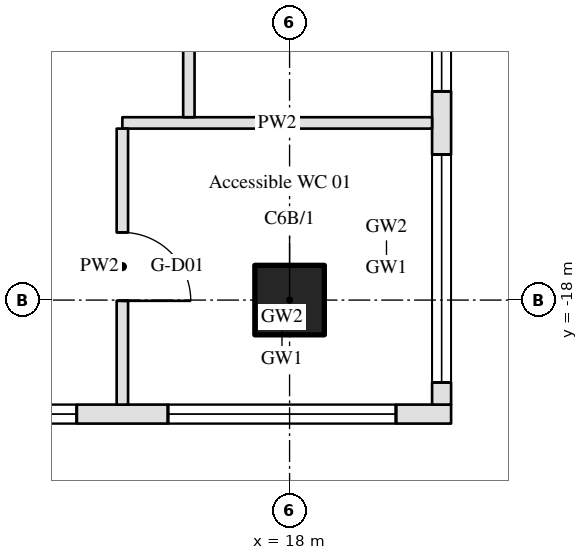
"""IFC4 building model, lengths in metres.
Left out: names, types, materials, properties, quantities, classifications, styles, units other than length and angle.
Written with IfcOpenShell. Run it as: python <this file> out.ifc"""

import sys

from ifc_helpers import new_model, si_unit, direction, frame, frame_2d, origin, origin_2d, place, context, subcontext, project, spatial, rectangle, hollow_circle, extrude, element, fill, save


model = new_model("IFC4")
c1 = context("Model", 3, precision=1e-05, world=origin(), true_north=direction((0.0, 1.0)))
c2 = subcontext(c1, "Body", "Model", "MODEL_VIEW")
j1 = project(units=[si_unit("LENGTHUNIT", "METRE"), si_unit("PLANEANGLEUNIT", "RADIAN")], contexts=[c1])
p1 = place(None, origin())
s1 = spatial("IfcSite", under=j1, at=p1, CompositionType="ELEMENT")
p2 = place(p1, origin())
s2 = spatial("IfcBuilding", under=s1, at=p2, CompositionType="ELEMENT")
p3 = place(p2, origin())
s3 = spatial("IfcBuildingStorey", under=s2, at=p3, CompositionType="ELEMENT", Elevation=0.0)
p4 = place(p3, frame((18.0, -18.0, 0.0), z_axis=(0.0, 0.0, 1.0), x_axis=(1.0, 0.0, 0.0)))
e1 = element("IfcColumn", 1, at=p4, inside=s3, PredefinedType="COLUMN", context=c2, shape_type="SweptSolid", body=[
    extrude(hollow_circle(Radius=0.457, WallThickness=0.05, at=origin_2d()), origin(), (0.0, 0.0, 1.0), 10.8),
])
p5 = place(p3, frame((-22.125, -19.5, 0.0), z_axis=(0.0, 0.0, 1.0), x_axis=(1.0, 0.0, 0.0)))
e2 = element("IfcWall", 2, at=p5, inside=s3, PredefinedType="STANDARD", context=c2, shape_type="SweptSolid", body=[
    extrude(rectangle(XDim=42.25, YDim=0.25, at=frame_2d((21.125, 0.0))), origin(), (0.0, 0.0, 1.0), 10.0),
])
p6 = place(p5, frame((0.725, 0.0, 0.15)))
e3 = element("IfcOpeningElement", 3, at=p6, cuts=e2, PredefinedType="OPENING", context=c2, shape_type="SweptSolid", body=[
    extrude(rectangle(XDim=3.0, YDim=4.2, at=frame_2d((1.5, 2.1))), frame((0.0, 0.135, 0.0), z_axis=(0.0, -1.0, 0.0), x_axis=(1.0, 0.0, 0.0)), (0.0, 0.0, 1.0), 0.27),
])
p7 = place(p5, frame((0.725, 0.0, 4.95)))
e4 = element("IfcOpeningElement", 4, at=p7, cuts=e2, PredefinedType="OPENING", context=c2, shape_type="SweptSolid", body=[
    extrude(rectangle(XDim=3.0, YDim=4.4, at=frame_2d((1.5, 2.2))), frame((0.0, 0.135, 0.0), z_axis=(0.0, -1.0, 0.0), x_axis=(1.0, 0.0, 0.0)), (0.0, 0.0, 1.0), 0.27),
])
p8 = place(p5, frame((4.925, 0.0, 0.15)))
e5 = element("IfcOpeningElement", 5, at=p8, cuts=e2, PredefinedType="OPENING", context=c2, shape_type="SweptSolid", body=[
    extrude(rectangle(XDim=3.0, YDim=4.2, at=frame_2d((1.5, 2.1))), frame((0.0, 0.135, 0.0), z_axis=(0.0, -1.0, 0.0), x_axis=(1.0, 0.0, 0.0)), (0.0, 0.0, 1.0), 0.27),
])
p9 = place(p5, frame((4.925, 0.0, 4.95)))
e6 = element("IfcOpeningElement", 6, at=p9, cuts=e2, PredefinedType="OPENING", context=c2, shape_type="SweptSolid", body=[
    extrude(rectangle(XDim=3.0, YDim=4.4, at=frame_2d((1.5, 2.2))), frame((0.0, 0.135, 0.0), z_axis=(0.0, -1.0, 0.0), x_axis=(1.0, 0.0, 0.0)), (0.0, 0.0, 1.0), 0.27),
])
p10 = place(p5, frame((9.125, 0.0, 0.15)))
e7 = element("IfcOpeningElement", 7, at=p10, cuts=e2, PredefinedType="OPENING", context=c2, shape_type="SweptSolid", body=[
    extrude(rectangle(XDim=3.0, YDim=4.2, at=frame_2d((1.5, 2.1))), frame((0.0, 0.135, 0.0), z_axis=(0.0, -1.0, 0.0), x_axis=(1.0, 0.0, 0.0)), (0.0, 0.0, 1.0), 0.27),
])
p11 = place(p5, frame((9.125, 0.0, 4.95)))
e8 = element("IfcOpeningElement", 8, at=p11, cuts=e2, PredefinedType="OPENING", context=c2, shape_type="SweptSolid", body=[
    extrude(rectangle(XDim=3.0, YDim=4.4, at=frame_2d((1.5, 2.2))), frame((0.0, 0.135, 0.0), z_axis=(0.0, -1.0, 0.0), x_axis=(1.0, 0.0, 0.0)), (0.0, 0.0, 1.0), 0.27),
])
p12 = place(p5, frame((13.325, 0.0, 0.15)))
e9 = element("IfcOpeningElement", 9, at=p12, cuts=e2, PredefinedType="OPENING", context=c2, shape_type="SweptSolid", body=[
    extrude(rectangle(XDim=3.0, YDim=4.2, at=frame_2d((1.5, 2.1))), frame((0.0, 0.135, 0.0), z_axis=(0.0, -1.0, 0.0), x_axis=(1.0, 0.0, 0.0)), (0.0, 0.0, 1.0), 0.27),
])
p13 = place(p5, frame((13.325, 0.0, 4.95)))
e10 = element("IfcOpeningElement", 10, at=p13, cuts=e2, PredefinedType="OPENING", context=c2, shape_type="SweptSolid", body=[
    extrude(rectangle(XDim=3.0, YDim=4.4, at=frame_2d((1.5, 2.2))), frame((0.0, 0.135, 0.0), z_axis=(0.0, -1.0, 0.0), x_axis=(1.0, 0.0, 0.0)), (0.0, 0.0, 1.0), 0.27),
])
p14 = place(p5, frame((17.825, 0.0, 0.0)))
e11 = element("IfcOpeningElement", 11, at=p14, cuts=e2, PredefinedType="OPENING", context=c2, shape_type="SweptSolid", body=[
    extrude(rectangle(XDim=2.4, YDim=2.6, at=frame_2d((1.2, 1.3))), frame((0.0, 0.135, 0.0), z_axis=(0.0, -1.0, 0.0), x_axis=(1.0, 0.0, 0.0)), (0.0, 0.0, 1.0), 0.27),
])
p15 = place(p5, frame((17.525, 0.0, 2.9)))
e12 = element("IfcOpeningElement", 12, at=p15, cuts=e2, PredefinedType="OPENING", context=c2, shape_type="SweptSolid", body=[
    extrude(rectangle(XDim=3.0, YDim=1.45, at=frame_2d((1.5, 0.725))), frame((0.0, 0.135, 0.0), z_axis=(0.0, -1.0, 0.0), x_axis=(1.0, 0.0, 0.0)), (0.0, 0.0, 1.0), 0.27),
])
p16 = place(p5, frame((17.525, 0.0, 4.95)))
e13 = element("IfcOpeningElement", 13, at=p16, cuts=e2, PredefinedType="OPENING", context=c2, shape_type="SweptSolid", body=[
    extrude(rectangle(XDim=3.0, YDim=4.4, at=frame_2d((1.5, 2.2))), frame((0.0, 0.135, 0.0), z_axis=(0.0, -1.0, 0.0), x_axis=(1.0, 0.0, 0.0)), (0.0, 0.0, 1.0), 0.27),
])
p17 = place(p5, frame((21.725, 0.0, 0.15)))
e14 = element("IfcOpeningElement", 14, at=p17, cuts=e2, PredefinedType="OPENING", context=c2, shape_type="SweptSolid", body=[
    extrude(rectangle(XDim=3.0, YDim=4.2, at=frame_2d((1.5, 2.1))), frame((0.0, 0.135, 0.0), z_axis=(0.0, -1.0, 0.0), x_axis=(1.0, 0.0, 0.0)), (0.0, 0.0, 1.0), 0.27),
])
p18 = place(p5, frame((21.725, 0.0, 4.95)))
e15 = element("IfcOpeningElement", 15, at=p18, cuts=e2, PredefinedType="OPENING", context=c2, shape_type="SweptSolid", body=[
    extrude(rectangle(XDim=3.0, YDim=4.4, at=frame_2d((1.5, 2.2))), frame((0.0, 0.135, 0.0), z_axis=(0.0, -1.0, 0.0), x_axis=(1.0, 0.0, 0.0)), (0.0, 0.0, 1.0), 0.27),
])
p19 = place(p5, frame((26.225, 0.0, 0.0)))
e16 = element("IfcOpeningElement", 16, at=p19, cuts=e2, PredefinedType="OPENING", context=c2, shape_type="SweptSolid", body=[
    extrude(rectangle(XDim=2.4, YDim=2.6, at=frame_2d((1.2, 1.3))), frame((0.0, 0.135, 0.0), z_axis=(0.0, -1.0, 0.0), x_axis=(1.0, 0.0, 0.0)), (0.0, 0.0, 1.0), 0.27),
])
p20 = place(p5, frame((25.925, 0.0, 2.9)))
e17 = element("IfcOpeningElement", 17, at=p20, cuts=e2, PredefinedType="OPENING", context=c2, shape_type="SweptSolid", body=[
    extrude(rectangle(XDim=3.0, YDim=1.45, at=frame_2d((1.5, 0.725))), frame((0.0, 0.135, 0.0), z_axis=(0.0, -1.0, 0.0), x_axis=(1.0, 0.0, 0.0)), (0.0, 0.0, 1.0), 0.27),
])
p21 = place(p5, frame((25.925, 0.0, 4.95)))
e18 = element("IfcOpeningElement", 18, at=p21, cuts=e2, PredefinedType="OPENING", context=c2, shape_type="SweptSolid", body=[
    extrude(rectangle(XDim=3.0, YDim=4.4, at=frame_2d((1.5, 2.2))), frame((0.0, 0.135, 0.0), z_axis=(0.0, -1.0, 0.0), x_axis=(1.0, 0.0, 0.0)), (0.0, 0.0, 1.0), 0.27),
])
p22 = place(p5, frame((30.125, 0.0, 0.15)))
e19 = element("IfcOpeningElement", 19, at=p22, cuts=e2, PredefinedType="OPENING", context=c2, shape_type="SweptSolid", body=[
    extrude(rectangle(XDim=3.0, YDim=4.2, at=frame_2d((1.5, 2.1))), frame((0.0, 0.135, 0.0), z_axis=(0.0, -1.0, 0.0), x_axis=(1.0, 0.0, 0.0)), (0.0, 0.0, 1.0), 0.27),
])
p23 = place(p5, frame((30.125, 0.0, 4.95)))
e20 = element("IfcOpeningElement", 20, at=p23, cuts=e2, PredefinedType="OPENING", context=c2, shape_type="SweptSolid", body=[
    extrude(rectangle(XDim=3.0, YDim=4.4, at=frame_2d((1.5, 2.2))), frame((0.0, 0.135, 0.0), z_axis=(0.0, -1.0, 0.0), x_axis=(1.0, 0.0, 0.0)), (0.0, 0.0, 1.0), 0.27),
])
p24 = place(p5, frame((34.325, 0.0, 0.15)))
e21 = element("IfcOpeningElement", 21, at=p24, cuts=e2, PredefinedType="OPENING", context=c2, shape_type="SweptSolid", body=[
    extrude(rectangle(XDim=3.0, YDim=4.2, at=frame_2d((1.5, 2.1))), frame((0.0, 0.135, 0.0), z_axis=(0.0, -1.0, 0.0), x_axis=(1.0, 0.0, 0.0)), (0.0, 0.0, 1.0), 0.27),
])
p25 = place(p5, frame((34.325, 0.0, 4.95)))
e22 = element("IfcOpeningElement", 22, at=p25, cuts=e2, PredefinedType="OPENING", context=c2, shape_type="SweptSolid", body=[
    extrude(rectangle(XDim=3.0, YDim=4.4, at=frame_2d((1.5, 2.2))), frame((0.0, 0.135, 0.0), z_axis=(0.0, -1.0, 0.0), x_axis=(1.0, 0.0, 0.0)), (0.0, 0.0, 1.0), 0.27),
])
p26 = place(p5, frame((38.525, 0.0, 0.15)))
e23 = element("IfcOpeningElement", 23, at=p26, cuts=e2, PredefinedType="OPENING", context=c2, shape_type="SweptSolid", body=[
    extrude(rectangle(XDim=3.0, YDim=4.2, at=frame_2d((1.5, 2.1))), frame((0.0, 0.135, 0.0), z_axis=(0.0, -1.0, 0.0), x_axis=(1.0, 0.0, 0.0)), (0.0, 0.0, 1.0), 0.27),
])
p27 = place(p5, frame((38.525, 0.0, 4.95)))
e24 = element("IfcOpeningElement", 24, at=p27, cuts=e2, PredefinedType="OPENING", context=c2, shape_type="SweptSolid", body=[
    extrude(rectangle(XDim=3.0, YDim=4.4, at=frame_2d((1.5, 2.2))), frame((0.0, 0.135, 0.0), z_axis=(0.0, -1.0, 0.0), x_axis=(1.0, 0.0, 0.0)), (0.0, 0.0, 1.0), 0.27),
])
p28 = place(p3, frame((20.0, -19.375, 0.0), z_axis=(0.0, 0.0, 1.0), x_axis=(0.0, 1.0, 0.0)))
e25 = element("IfcWall", 25, at=p28, inside=s3, PredefinedType="STANDARD", context=c2, shape_type="SweptSolid", body=[
    extrude(rectangle(XDim=30.4, YDim=0.25, at=frame_2d((15.2, 0.0))), origin(), (0.0, 0.0, 1.0), 10.0),
])
p29 = place(p28, frame((0.291, 0.0, 0.15)))
e26 = element("IfcOpeningElement", 26, at=p29, cuts=e25, PredefinedType="OPENING", context=c2, shape_type="SweptSolid", body=[
    extrude(rectangle(XDim=3.0, YDim=4.2, at=frame_2d((1.5, 2.1))), frame((0.0, 0.135, 0.0), z_axis=(0.0, -1.0, 0.0), x_axis=(1.0, 0.0, 0.0)), (0.0, 0.0, 1.0), 0.27),
])
p30 = place(p28, frame((0.291, 0.0, 4.95)))
e27 = element("IfcOpeningElement", 27, at=p30, cuts=e25, PredefinedType="OPENING", context=c2, shape_type="SweptSolid", body=[
    extrude(rectangle(XDim=3.0, YDim=4.4, at=frame_2d((1.5, 2.2))), frame((0.0, 0.135, 0.0), z_axis=(0.0, -1.0, 0.0), x_axis=(1.0, 0.0, 0.0)), (0.0, 0.0, 1.0), 0.27),
])
p31 = place(p28, frame((4.122, 0.0, 0.15)))
e28 = element("IfcOpeningElement", 28, at=p31, cuts=e25, PredefinedType="OPENING", context=c2, shape_type="SweptSolid", body=[
    extrude(rectangle(XDim=3.0, YDim=4.2, at=frame_2d((1.5, 2.1))), frame((0.0, 0.135, 0.0), z_axis=(0.0, -1.0, 0.0), x_axis=(1.0, 0.0, 0.0)), (0.0, 0.0, 1.0), 0.27),
])
p32 = place(p28, frame((4.122, 0.0, 4.95)))
e29 = element("IfcOpeningElement", 29, at=p32, cuts=e25, PredefinedType="OPENING", context=c2, shape_type="SweptSolid", body=[
    extrude(rectangle(XDim=3.0, YDim=4.4, at=frame_2d((1.5, 2.2))), frame((0.0, 0.135, 0.0), z_axis=(0.0, -1.0, 0.0), x_axis=(1.0, 0.0, 0.0)), (0.0, 0.0, 1.0), 0.27),
])
p33 = place(p28, frame((7.953, 0.0, 0.15)))
e30 = element("IfcOpeningElement", 30, at=p33, cuts=e25, PredefinedType="OPENING", context=c2, shape_type="SweptSolid", body=[
    extrude(rectangle(XDim=3.0, YDim=4.2, at=frame_2d((1.5, 2.1))), frame((0.0, 0.135, 0.0), z_axis=(0.0, -1.0, 0.0), x_axis=(1.0, 0.0, 0.0)), (0.0, 0.0, 1.0), 0.27),
])
p34 = place(p28, frame((7.953, 0.0, 4.95)))
e31 = element("IfcOpeningElement", 31, at=p34, cuts=e25, PredefinedType="OPENING", context=c2, shape_type="SweptSolid", body=[
    extrude(rectangle(XDim=3.0, YDim=4.4, at=frame_2d((1.5, 2.2))), frame((0.0, 0.135, 0.0), z_axis=(0.0, -1.0, 0.0), x_axis=(1.0, 0.0, 0.0)), (0.0, 0.0, 1.0), 0.27),
])
p35 = place(p28, frame((12.084, 0.0, 0.0)))
e32 = element("IfcOpeningElement", 32, at=p35, cuts=e25, PredefinedType="OPENING", context=c2, shape_type="SweptSolid", body=[
    extrude(rectangle(XDim=2.4, YDim=2.6, at=frame_2d((1.2, 1.3))), frame((0.0, 0.135, 0.0), z_axis=(0.0, -1.0, 0.0), x_axis=(1.0, 0.0, 0.0)), (0.0, 0.0, 1.0), 0.27),
])
p36 = place(p28, frame((11.784, 0.0, 2.9)))
e33 = element("IfcOpeningElement", 33, at=p36, cuts=e25, PredefinedType="OPENING", context=c2, shape_type="SweptSolid", body=[
    extrude(rectangle(XDim=3.0, YDim=1.45, at=frame_2d((1.5, 0.725))), frame((0.0, 0.135, 0.0), z_axis=(0.0, -1.0, 0.0), x_axis=(1.0, 0.0, 0.0)), (0.0, 0.0, 1.0), 0.27),
])
p37 = place(p28, frame((11.784, 0.0, 4.95)))
e34 = element("IfcOpeningElement", 34, at=p37, cuts=e25, PredefinedType="OPENING", context=c2, shape_type="SweptSolid", body=[
    extrude(rectangle(XDim=3.0, YDim=4.4, at=frame_2d((1.5, 2.2))), frame((0.0, 0.135, 0.0), z_axis=(0.0, -1.0, 0.0), x_axis=(1.0, 0.0, 0.0)), (0.0, 0.0, 1.0), 0.27),
])
p38 = place(p28, frame((15.616, 0.0, 0.15)))
e35 = element("IfcOpeningElement", 35, at=p38, cuts=e25, PredefinedType="OPENING", context=c2, shape_type="SweptSolid", body=[
    extrude(rectangle(XDim=3.0, YDim=4.2, at=frame_2d((1.5, 2.1))), frame((0.0, 0.135, 0.0), z_axis=(0.0, -1.0, 0.0), x_axis=(1.0, 0.0, 0.0)), (0.0, 0.0, 1.0), 0.27),
])
p39 = place(p28, frame((15.616, 0.0, 4.95)))
e36 = element("IfcOpeningElement", 36, at=p39, cuts=e25, PredefinedType="OPENING", context=c2, shape_type="SweptSolid", body=[
    extrude(rectangle(XDim=3.0, YDim=4.4, at=frame_2d((1.5, 2.2))), frame((0.0, 0.135, 0.0), z_axis=(0.0, -1.0, 0.0), x_axis=(1.0, 0.0, 0.0)), (0.0, 0.0, 1.0), 0.27),
])
p40 = place(p28, frame((19.447, 0.0, 0.15)))
e37 = element("IfcOpeningElement", 37, at=p40, cuts=e25, PredefinedType="OPENING", context=c2, shape_type="SweptSolid", body=[
    extrude(rectangle(XDim=3.0, YDim=4.2, at=frame_2d((1.5, 2.1))), frame((0.0, 0.135, 0.0), z_axis=(0.0, -1.0, 0.0), x_axis=(1.0, 0.0, 0.0)), (0.0, 0.0, 1.0), 0.27),
])
p41 = place(p28, frame((19.447, 0.0, 4.95)))
e38 = element("IfcOpeningElement", 38, at=p41, cuts=e25, PredefinedType="OPENING", context=c2, shape_type="SweptSolid", body=[
    extrude(rectangle(XDim=3.0, YDim=4.4, at=frame_2d((1.5, 2.2))), frame((0.0, 0.135, 0.0), z_axis=(0.0, -1.0, 0.0), x_axis=(1.0, 0.0, 0.0)), (0.0, 0.0, 1.0), 0.27),
])
p42 = place(p28, frame((23.278, 0.0, 0.15)))
e39 = element("IfcOpeningElement", 39, at=p42, cuts=e25, PredefinedType="OPENING", context=c2, shape_type="SweptSolid", body=[
    extrude(rectangle(XDim=3.0, YDim=4.2, at=frame_2d((1.5, 2.1))), frame((0.0, 0.135, 0.0), z_axis=(0.0, -1.0, 0.0), x_axis=(1.0, 0.0, 0.0)), (0.0, 0.0, 1.0), 0.27),
])
p43 = place(p28, frame((23.278, 0.0, 4.95)))
e40 = element("IfcOpeningElement", 40, at=p43, cuts=e25, PredefinedType="OPENING", context=c2, shape_type="SweptSolid", body=[
    extrude(rectangle(XDim=3.0, YDim=4.4, at=frame_2d((1.5, 2.2))), frame((0.0, 0.135, 0.0), z_axis=(0.0, -1.0, 0.0), x_axis=(1.0, 0.0, 0.0)), (0.0, 0.0, 1.0), 0.27),
])
p44 = place(p28, frame((27.109, 0.0, 0.15)))
e41 = element("IfcOpeningElement", 41, at=p44, cuts=e25, PredefinedType="OPENING", context=c2, shape_type="SweptSolid", body=[
    extrude(rectangle(XDim=3.0, YDim=4.2, at=frame_2d((1.5, 2.1))), frame((0.0, 0.135, 0.0), z_axis=(0.0, -1.0, 0.0), x_axis=(1.0, 0.0, 0.0)), (0.0, 0.0, 1.0), 0.27),
])
p45 = place(p28, frame((27.109, 0.0, 4.95)))
e42 = element("IfcOpeningElement", 42, at=p45, cuts=e25, PredefinedType="OPENING", context=c2, shape_type="SweptSolid", body=[
    extrude(rectangle(XDim=3.0, YDim=4.4, at=frame_2d((1.5, 2.2))), frame((0.0, 0.135, 0.0), z_axis=(0.0, -1.0, 0.0), x_axis=(1.0, 0.0, 0.0)), (0.0, 0.0, 1.0), 0.27),
])
p46 = place(p3, frame((15.8, -15.669, 0.0), z_axis=(0.0, 0.0, 1.0), x_axis=(1.0, 0.0, 0.0)))
e43 = element("IfcWall", 43, at=p46, inside=s3, PredefinedType="PARTITIONING", context=c2, shape_type="SweptSolid", body=[
    extrude(rectangle(XDim=4.075, YDim=0.15, at=frame_2d((2.038, 0.0))), origin(), (0.0, 0.0, 1.0), 9.86),
])
p47 = place(p3, frame((15.8, -15.744, 0.0), z_axis=(0.0, 0.0, 1.0), x_axis=(0.0, -1.0, 0.0)))
e44 = element("IfcWall", 44, at=p47, inside=s3, PredefinedType="PARTITIONING", context=c2, shape_type="SweptSolid", body=[
    extrude(rectangle(XDim=3.631, YDim=0.15, at=frame_2d((1.815, 0.0))), origin(), (0.0, 0.0, 1.0), 9.86),
])
p48 = place(p47, frame((1.365, 0.0, 0.0)))
e45 = element("IfcOpeningElement", 45, at=p48, cuts=e44, PredefinedType="OPENING", context=c2, shape_type="SweptSolid", body=[
    extrude(rectangle(XDim=0.9, YDim=2.1, at=frame_2d((0.45, 1.05))), frame((0.0, 0.085, 0.0), z_axis=(0.0, -1.0, 0.0), x_axis=(1.0, 0.0, 0.0)), (0.0, 0.0, 1.0), 0.17),
])
p49 = place(p3, frame((16.675, -8.081, 0.0), z_axis=(0.0, 0.0, 1.0), x_axis=(0.0, -1.0, 0.0)))
e46 = element("IfcWall", 46, at=p49, inside=s3, PredefinedType="PARTITIONING", context=c2, shape_type="SweptSolid", body=[
    extrude(rectangle(XDim=7.513, YDim=0.15, at=frame_2d((3.756, 0.0))), origin(), (0.0, 0.0, 1.0), 9.86),
])
p50 = place(p49, frame((3.257, 0.0, 0.0)))
e47 = element("IfcOpeningElement", 47, at=p50, cuts=e46, PredefinedType="OPENING", context=c2, shape_type="SweptSolid", body=[
    extrude(rectangle(XDim=1.0, YDim=2.1, at=frame_2d((0.5, 1.05))), frame((0.0, 0.085, 0.0), z_axis=(0.0, -1.0, 0.0), x_axis=(1.0, 0.0, 0.0)), (0.0, 0.0, 1.0), 0.17),
])
p51 = place(p24, origin())
e48 = element("IfcWindow", 48, at=p51, inside=s3, PartitioningType="DOUBLE_PANEL_HORIZONTAL", PredefinedType="WINDOW", context=c2, shape_type="SweptSolid", body=[
    extrude(rectangle(XDim=3.0, YDim=4.2, at=frame_2d((1.5, 2.1))), frame((0.0, 0.03, 0.0), z_axis=(0.0, -1.0, 0.0), x_axis=(1.0, 0.0, 0.0)), (0.0, 0.0, 1.0), 0.06),
])
fill(e21, e48)
p52 = place(p25, origin())
e49 = element("IfcWindow", 49, at=p52, inside=s3, PartitioningType="DOUBLE_PANEL_HORIZONTAL", PredefinedType="WINDOW", context=c2, shape_type="SweptSolid", body=[
    extrude(rectangle(XDim=3.0, YDim=4.4, at=frame_2d((1.5, 2.2))), frame((0.0, 0.03, 0.0), z_axis=(0.0, -1.0, 0.0), x_axis=(1.0, 0.0, 0.0)), (0.0, 0.0, 1.0), 0.06),
])
fill(e22, e49)
p53 = place(p26, origin())
e50 = element("IfcWindow", 50, at=p53, inside=s3, PartitioningType="DOUBLE_PANEL_HORIZONTAL", PredefinedType="WINDOW", context=c2, shape_type="SweptSolid", body=[
    extrude(rectangle(XDim=3.0, YDim=4.2, at=frame_2d((1.5, 2.1))), frame((0.0, 0.03, 0.0), z_axis=(0.0, -1.0, 0.0), x_axis=(1.0, 0.0, 0.0)), (0.0, 0.0, 1.0), 0.06),
])
fill(e23, e50)
p54 = place(p27, origin())
e51 = element("IfcWindow", 51, at=p54, inside=s3, PartitioningType="DOUBLE_PANEL_HORIZONTAL", PredefinedType="WINDOW", context=c2, shape_type="SweptSolid", body=[
    extrude(rectangle(XDim=3.0, YDim=4.4, at=frame_2d((1.5, 2.2))), frame((0.0, 0.03, 0.0), z_axis=(0.0, -1.0, 0.0), x_axis=(1.0, 0.0, 0.0)), (0.0, 0.0, 1.0), 0.06),
])
fill(e24, e51)
p55 = place(p29, origin())
e52 = element("IfcWindow", 52, at=p55, inside=s3, PartitioningType="DOUBLE_PANEL_HORIZONTAL", PredefinedType="WINDOW", context=c2, shape_type="SweptSolid", body=[
    extrude(rectangle(XDim=3.0, YDim=4.2, at=frame_2d((1.5, 2.1))), frame((0.0, 0.03, 0.0), z_axis=(0.0, -1.0, 0.0), x_axis=(1.0, 0.0, 0.0)), (0.0, 0.0, 1.0), 0.06),
])
fill(e26, e52)
p56 = place(p30, origin())
e53 = element("IfcWindow", 53, at=p56, inside=s3, PartitioningType="DOUBLE_PANEL_HORIZONTAL", PredefinedType="WINDOW", context=c2, shape_type="SweptSolid", body=[
    extrude(rectangle(XDim=3.0, YDim=4.4, at=frame_2d((1.5, 2.2))), frame((0.0, 0.03, 0.0), z_axis=(0.0, -1.0, 0.0), x_axis=(1.0, 0.0, 0.0)), (0.0, 0.0, 1.0), 0.06),
])
fill(e27, e53)
p57 = place(p31, origin())
e54 = element("IfcWindow", 54, at=p57, inside=s3, PartitioningType="DOUBLE_PANEL_HORIZONTAL", PredefinedType="WINDOW", context=c2, shape_type="SweptSolid", body=[
    extrude(rectangle(XDim=3.0, YDim=4.2, at=frame_2d((1.5, 2.1))), frame((0.0, 0.03, 0.0), z_axis=(0.0, -1.0, 0.0), x_axis=(1.0, 0.0, 0.0)), (0.0, 0.0, 1.0), 0.06),
])
fill(e28, e54)
p58 = place(p32, origin())
e55 = element("IfcWindow", 55, at=p58, inside=s3, PartitioningType="DOUBLE_PANEL_HORIZONTAL", PredefinedType="WINDOW", context=c2, shape_type="SweptSolid", body=[
    extrude(rectangle(XDim=3.0, YDim=4.4, at=frame_2d((1.5, 2.2))), frame((0.0, 0.03, 0.0), z_axis=(0.0, -1.0, 0.0), x_axis=(1.0, 0.0, 0.0)), (0.0, 0.0, 1.0), 0.06),
])
fill(e29, e55)
p59 = place(p48, origin())
e56 = element("IfcDoor", 56, at=p59, inside=s3, OperationType="SINGLE_SWING_RIGHT", PredefinedType="DOOR", context=c2, shape_type="SweptSolid", body=[
    extrude(rectangle(XDim=0.9, YDim=2.1, at=frame_2d((0.45, 1.05))), frame((0.0, 0.025, 0.0), z_axis=(0.0, -1.0, 0.0), x_axis=(1.0, 0.0, 0.0)), (0.0, 0.0, 1.0), 0.05),
])
fill(e45, e56)
save(model, sys.argv[1])
